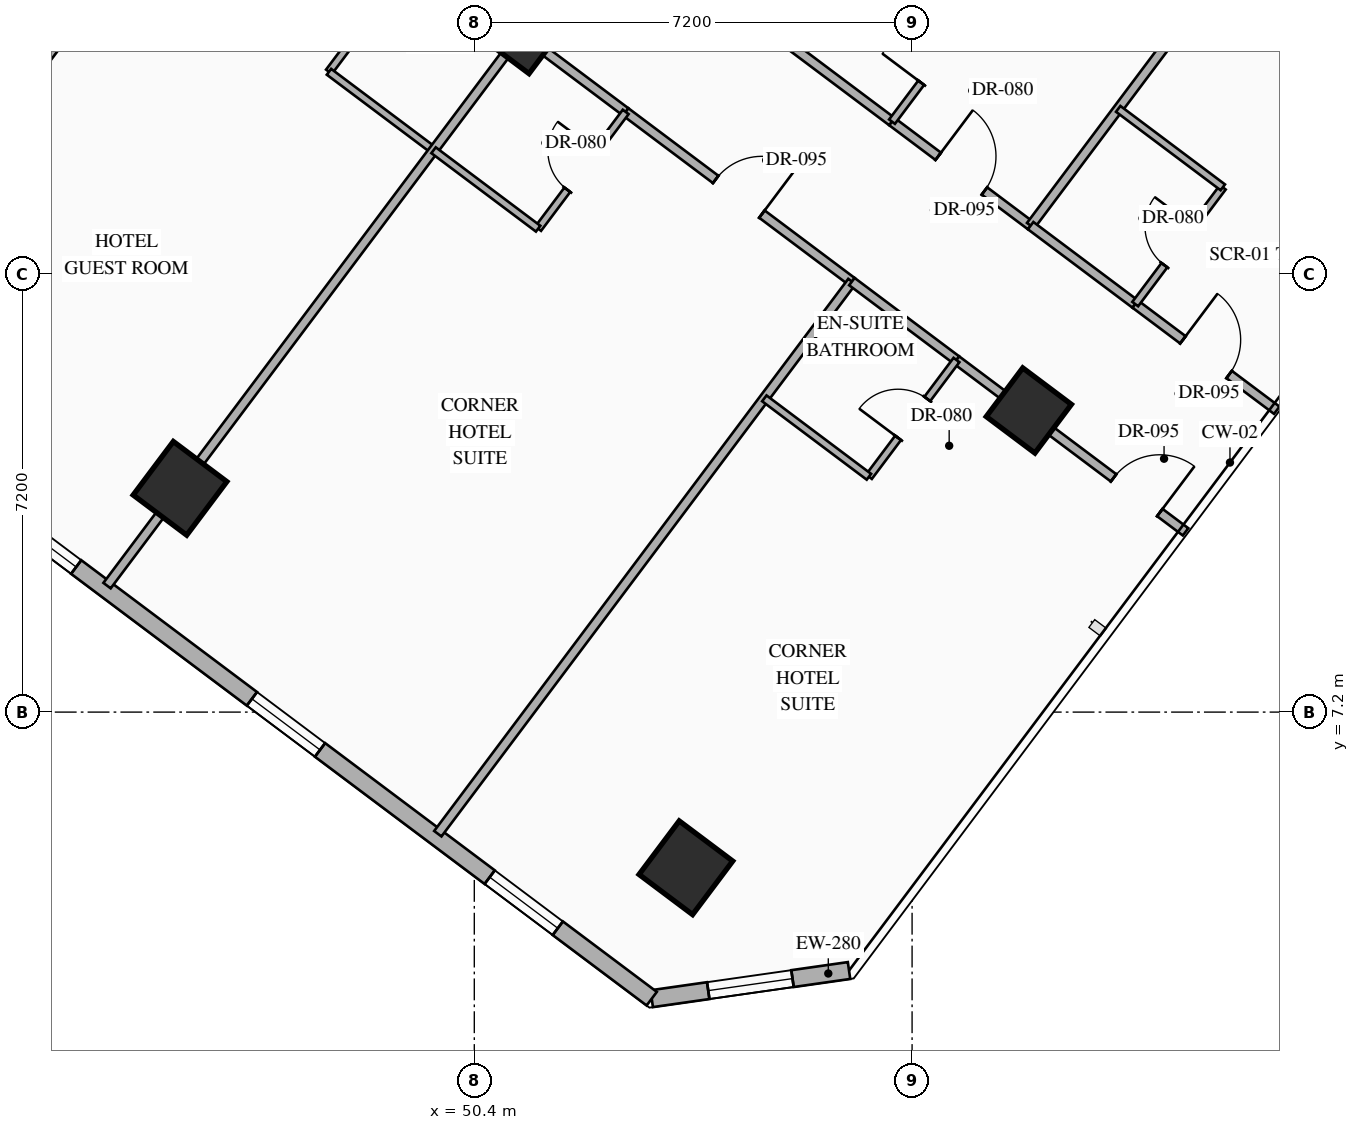
"""IFC4 building model, lengths in metres.
Left out: names, types, materials, properties, quantities, classifications, styles, units other than length and angle.
Written with IfcOpenShell. Run it as: python <this file> out.ifc"""

import sys

from ifc_helpers import new_model, si_unit, direction, frame, frame_2d, origin, origin_2d, place, context, subcontext, project, spatial, rectangle, hollow_rectangle, extrude, element, fill, save


model = new_model("IFC4")
c1 = context("Model", 3, precision=1e-05, world=origin(), true_north=direction((0.0, 1.0)))
c2 = subcontext(c1, "Body", "Model", "MODEL_VIEW")
j1 = project(units=[si_unit("LENGTHUNIT", "METRE"), si_unit("PLANEANGLEUNIT", "RADIAN")], contexts=[c1])
p1 = place(None, origin())
s1 = spatial("IfcSite", under=j1, at=p1, CompositionType="ELEMENT")
p2 = place(p1, origin())
s2 = spatial("IfcBuilding", under=s1, at=p2, CompositionType="ELEMENT")
p3 = place(p2, frame((0.0, 0.0, 50.0)))
s3 = spatial("IfcBuildingStorey", under=s2, at=p3, CompositionType="ELEMENT", Elevation=50.0)
p4 = place(p3, frame((45.56, 10.88, 0.0), z_axis=(0.0, 0.0, 1.0), x_axis=(0.799999996291, -0.600000004945, 0.0)))
e1 = element("IfcColumn", 1, at=p4, inside=s3, PredefinedType="COLUMN", context=c2, shape_type="SweptSolid", body=[
    extrude(hollow_rectangle(XDim=1.1, YDim=1.1, WallThickness=0.04, at=origin_2d()), origin(), (0.0, 0.0, 1.0), 3.35),
])
p5 = place(p3, frame((51.2, 18.4, 0.0), z_axis=(0.0, 0.0, 1.0), x_axis=(0.799999996291, -0.600000004945, 0.0)))
e2 = element("IfcColumn", 2, at=p5, inside=s3, PredefinedType="COLUMN", context=c2, shape_type="SweptSolid", body=[
    extrude(hollow_rectangle(XDim=1.0, YDim=1.0, WallThickness=0.038, at=origin_2d()), origin(), (0.0, 0.0, 1.0), 3.35),
])
p6 = place(p3, frame((53.88, 4.64, 0.0), z_axis=(0.0, 0.0, 1.0), x_axis=(0.799999996291, -0.600000004945, 0.0)))
e3 = element("IfcColumn", 3, at=p6, inside=s3, PredefinedType="COLUMN", context=c2, shape_type="SweptSolid", body=[
    extrude(hollow_rectangle(XDim=1.1, YDim=1.1, WallThickness=0.04, at=origin_2d()), origin(), (0.0, 0.0, 1.0), 3.35),
])
p7 = place(p3, frame((59.52, 12.16, 0.0), z_axis=(0.0, 0.0, 1.0), x_axis=(0.799999996291, -0.600000004945, 0.0)))
e4 = element("IfcColumn", 4, at=p7, inside=s3, PredefinedType="COLUMN", context=c2, shape_type="SweptSolid", body=[
    extrude(hollow_rectangle(XDim=1.0, YDim=1.0, WallThickness=0.038, at=origin_2d()), origin(), (0.0, 0.0, 1.0), 3.35),
])
p8 = place(p3, frame((56.563, 2.95, 0.0), z_axis=(0.0, 0.0, 1.0), x_axis=(-0.989977778067, -0.141223223777, 0.0)))
e5 = element("IfcWall", 5, at=p8, inside=s3, PredefinedType="STANDARD", context=c2, shape_type="SweptSolid", body=[
    extrude(rectangle(XDim=3.278, YDim=0.28, at=frame_2d((1.639, 0.0))), origin(), (0.0, 0.0, 1.0), 3.13),
])
p9 = place(p8, frame((0.939, 0.0, 0.85)))
e6 = element("IfcOpeningElement", 6, at=p9, cuts=e5, PredefinedType="OPENING", context=c2, shape_type="SweptSolid", body=[
    extrude(rectangle(XDim=1.4, YDim=1.8, at=frame_2d((0.7, 0.9))), frame((0.0, 0.15, 0.0), z_axis=(0.0, -1.0, 0.0), x_axis=(1.0, 0.0, 0.0)), (0.0, 0.0, 1.0), 0.3),
])
p10 = place(p3, frame((53.318, 2.487, 0.0), z_axis=(0.0, 0.0, 1.0), x_axis=(-0.800004174678, 0.599994433723, 0.0)))
e7 = element("IfcWall", 7, at=p10, inside=s3, PredefinedType="STANDARD", context=c2, shape_type="SweptSolid", body=[
    extrude(rectangle(XDim=35.089, YDim=0.28, at=frame_2d((17.544, 0.0))), origin(), (0.0, 0.0, 1.0), 3.13),
])
p11 = place(p10, frame((1.931, 0.0, 0.85)))
e8 = element("IfcOpeningElement", 8, at=p11, cuts=e7, PredefinedType="OPENING", context=c2, shape_type="SweptSolid", body=[
    extrude(rectangle(XDim=1.4, YDim=1.8, at=frame_2d((0.7, 0.9))), frame((0.0, 0.15, 0.0), z_axis=(0.0, -1.0, 0.0), x_axis=(1.0, 0.0, 0.0)), (0.0, 0.0, 1.0), 0.3),
])
p12 = place(p10, frame((6.819, 0.0, 0.85)))
e9 = element("IfcOpeningElement", 9, at=p12, cuts=e7, PredefinedType="OPENING", context=c2, shape_type="SweptSolid", body=[
    extrude(rectangle(XDim=1.4, YDim=1.8, at=frame_2d((0.7, 0.9))), frame((0.0, 0.15, 0.0), z_axis=(0.0, -1.0, 0.0), x_axis=(1.0, 0.0, 0.0)), (0.0, 0.0, 1.0), 0.3),
])
p13 = place(p10, frame((11.832, 0.0, 0.85)))
e10 = element("IfcOpeningElement", 10, at=p13, cuts=e7, PredefinedType="OPENING", context=c2, shape_type="SweptSolid", body=[
    extrude(rectangle(XDim=1.4, YDim=1.8, at=frame_2d((0.7, 0.9))), frame((0.0, 0.15, 0.0), z_axis=(0.0, -1.0, 0.0), x_axis=(1.0, 0.0, 0.0)), (0.0, 0.0, 1.0), 0.3),
])
p14 = place(p10, frame((17.647, 0.0, 0.85)))
e11 = element("IfcOpeningElement", 11, at=p14, cuts=e7, PredefinedType="OPENING", context=c2, shape_type="SweptSolid", body=[
    extrude(rectangle(XDim=1.4, YDim=1.8, at=frame_2d((0.7, 0.9))), frame((0.0, 0.15, 0.0), z_axis=(0.0, -1.0, 0.0), x_axis=(1.0, 0.0, 0.0)), (0.0, 0.0, 1.0), 0.3),
])
p15 = place(p10, frame((21.857, 0.0, 0.85)))
e12 = element("IfcOpeningElement", 12, at=p15, cuts=e7, PredefinedType="OPENING", context=c2, shape_type="SweptSolid", body=[
    extrude(rectangle(XDim=1.4, YDim=1.8, at=frame_2d((0.7, 0.9))), frame((0.0, 0.15, 0.0), z_axis=(0.0, -1.0, 0.0), x_axis=(1.0, 0.0, 0.0)), (0.0, 0.0, 1.0), 0.3),
])
p16 = place(p10, frame((26.87, 0.0, 0.85)))
e13 = element("IfcOpeningElement", 13, at=p16, cuts=e7, PredefinedType="OPENING", context=c2, shape_type="SweptSolid", body=[
    extrude(rectangle(XDim=1.4, YDim=1.8, at=frame_2d((0.7, 0.9))), frame((0.0, 0.15, 0.0), z_axis=(0.0, -1.0, 0.0), x_axis=(1.0, 0.0, 0.0)), (0.0, 0.0, 1.0), 0.3),
])
p17 = place(p10, frame((31.757, 0.0, 0.85)))
e14 = element("IfcOpeningElement", 14, at=p17, cuts=e7, PredefinedType="OPENING", context=c2, shape_type="SweptSolid", body=[
    extrude(rectangle(XDim=1.4, YDim=1.8, at=frame_2d((0.7, 0.9))), frame((0.0, 0.15, 0.0), z_axis=(0.0, -1.0, 0.0), x_axis=(1.0, 0.0, 0.0)), (0.0, 0.0, 1.0), 0.3),
])
p18 = place(p3, frame((39.464, 12.752, 0.0), z_axis=(0.0, 0.0, 1.0), x_axis=(0.6, 0.8, 0.0)))
e15 = element("IfcWall", 15, at=p18, inside=s3, PredefinedType="PARTITIONING", context=c2, shape_type="SweptSolid", body=[
    extrude(rectangle(XDim=11.51, YDim=0.15, at=frame_2d((5.755, 0.0))), origin(), (0.0, 0.0, 1.0), 3.13),
])
p19 = place(p3, frame((55.55, 18.2, 0.0), z_axis=(0.0, 0.0, 1.0), x_axis=(0.79998637334, -0.60001816845, 0.0)))
e16 = element("IfcWall", 16, at=p19, inside=s3, PredefinedType="PARTITIONING", context=c2, shape_type="SweptSolid", body=[
    extrude(rectangle(XDim=2.15, YDim=0.15, at=frame_2d((1.075, 0.0))), origin(), (0.0, 0.0, 1.0), 2.775),
])
p20 = place(p3, frame((57.27, 16.91, 0.0), z_axis=(0.0, 0.0, 1.0), x_axis=(0.800010279488, -0.599986293772, 0.0)))
e17 = element("IfcWall", 17, at=p20, inside=s3, PredefinedType="PARTITIONING", context=c2, shape_type="SweptSolid", body=[
    extrude(rectangle(XDim=2.85, YDim=0.15, at=frame_2d((1.425, 0.0))), origin(), (0.0, 0.0, 1.0), 2.775),
])
p21 = place(p20, frame((0.95, 0.0, 0.0)))
e18 = element("IfcOpeningElement", 18, at=p21, cuts=e17, PredefinedType="OPENING", context=c2, shape_type="SweptSolid", body=[
    extrude(rectangle(XDim=0.95, YDim=2.15, at=frame_2d((0.475, 1.075))), frame((0.0, 0.085, 0.0), z_axis=(0.0, -1.0, 0.0), x_axis=(1.0, 0.0, 0.0)), (0.0, 0.0, 1.0), 0.17),
])
p22 = place(p3, frame((57.27, 16.91, 0.0), z_axis=(0.0, 0.0, 1.0), x_axis=(0.599951172744, 0.800036618114, 0.0)))
e19 = element("IfcWall", 19, at=p22, inside=s3, PredefinedType="PARTITIONING", context=c2, shape_type="SweptSolid", body=[
    extrude(rectangle(XDim=2.4, YDim=0.12, at=frame_2d((1.2, 0.0))), origin(), (0.0, 0.0, 1.0), 3.13),
])
p23 = place(p22, frame((0.8, 0.0, 0.0)))
e20 = element("IfcOpeningElement", 20, at=p23, cuts=e19, PredefinedType="OPENING", context=c2, shape_type="SweptSolid", body=[
    extrude(rectangle(XDim=0.8, YDim=2.06, at=frame_2d((0.4, 1.03))), frame((0.0, 0.07, 0.0), z_axis=(0.0, -1.0, 0.0), x_axis=(1.0, 0.0, 0.0)), (0.0, 0.0, 1.0), 0.14),
])
p24 = place(p3, frame((59.55, 15.2, 0.0), z_axis=(0.0, 0.0, 1.0), x_axis=(0.599996617946, 0.80000253653, 0.0)))
e21 = element("IfcWall", 21, at=p24, inside=s3, PredefinedType="PARTITIONING", context=c2, shape_type="SweptSolid", body=[
    extrude(rectangle(XDim=11.55, YDim=0.15, at=frame_2d((5.775, 0.0))), origin(), (0.0, 0.0, 1.0), 3.13),
])
p25 = place(p3, frame((59.55, 15.2, 0.0), z_axis=(0.0, 0.0, 1.0), x_axis=(0.79998637334, -0.60001816845, 0.0)))
e22 = element("IfcWall", 22, at=p25, inside=s3, PredefinedType="PARTITIONING", context=c2, shape_type="SweptSolid", body=[
    extrude(rectangle(XDim=2.15, YDim=0.15, at=frame_2d((1.075, 0.0))), origin(), (0.0, 0.0, 1.0), 2.775),
])
p26 = place(p3, frame((61.27, 13.91, 0.0), z_axis=(0.0, 0.0, 1.0), x_axis=(0.800010068184, -0.59998657552, 0.0)))
e23 = element("IfcWall", 23, at=p26, inside=s3, PredefinedType="PARTITIONING", context=c2, shape_type="SweptSolid", body=[
    extrude(rectangle(XDim=2.91, YDim=0.15, at=frame_2d((1.455, 0.0))), origin(), (0.0, 0.0, 1.0), 3.13),
])
p27 = place(p26, frame((0.98, 0.0, 0.0)))
e24 = element("IfcOpeningElement", 24, at=p27, cuts=e23, PredefinedType="OPENING", context=c2, shape_type="SweptSolid", body=[
    extrude(rectangle(XDim=0.95, YDim=2.15, at=frame_2d((0.475, 1.075))), frame((0.0, 0.085, 0.0), z_axis=(0.0, -1.0, 0.0), x_axis=(1.0, 0.0, 0.0)), (0.0, 0.0, 1.0), 0.17),
])
p28 = place(p3, frame((61.27, 13.91, 0.0), z_axis=(0.0, 0.0, 1.0), x_axis=(0.599951172744, 0.800036618114, 0.0)))
e25 = element("IfcWall", 25, at=p28, inside=s3, PredefinedType="PARTITIONING", context=c2, shape_type="SweptSolid", body=[
    extrude(rectangle(XDim=2.4, YDim=0.12, at=frame_2d((1.2, 0.0))), origin(), (0.0, 0.0, 1.0), 3.13),
])
p29 = place(p28, frame((0.8, 0.0, 0.0)))
e26 = element("IfcOpeningElement", 26, at=p29, cuts=e25, PredefinedType="OPENING", context=c2, shape_type="SweptSolid", body=[
    extrude(rectangle(XDim=0.8, YDim=2.06, at=frame_2d((0.4, 1.03))), frame((0.0, 0.07, 0.0), z_axis=(0.0, -1.0, 0.0), x_axis=(1.0, 0.0, 0.0)), (0.0, 0.0, 1.0), 0.14),
])
p30 = place(p3, frame((60.99, 17.12, 0.0), z_axis=(0.0, 0.0, 1.0), x_axis=(0.79998637334, -0.60001816845, 0.0)))
e27 = element("IfcWall", 27, at=p30, inside=s3, PredefinedType="PARTITIONING", context=c2, shape_type="SweptSolid", body=[
    extrude(rectangle(XDim=2.15, YDim=0.12, at=frame_2d((1.075, 0.0))), origin(), (0.0, 0.0, 1.0), 3.13),
])
p31 = place(p3, frame((48.01, 17.73, 0.0), z_axis=(0.0, 0.0, 1.0), x_axis=(0.6, 0.8, 0.0)))
e28 = element("IfcWall", 28, at=p31, inside=s3, PredefinedType="PARTITIONING", context=c2, shape_type="SweptSolid", body=[
    extrude(rectangle(XDim=2.4, YDim=0.12, at=frame_2d((1.2, 0.0))), origin(), (0.0, 0.0, 1.0), 3.13),
])
p32 = place(p31, frame((0.8, 0.0, 0.0)))
e29 = element("IfcOpeningElement", 29, at=p32, cuts=e28, PredefinedType="OPENING", context=c2, shape_type="SweptSolid", body=[
    extrude(rectangle(XDim=0.8, YDim=2.06, at=frame_2d((0.4, 1.03))), frame((0.0, 0.07, 0.0), z_axis=(0.0, -1.0, 0.0), x_axis=(1.0, 0.0, 0.0)), (0.0, 0.0, 1.0), 0.14),
])
p33 = place(p3, frame((48.01, 17.73, 0.0), z_axis=(0.0, 0.0, 1.0), x_axis=(0.79998637334, -0.60001816845, 0.0)))
e30 = element("IfcWall", 30, at=p33, inside=s3, PredefinedType="PARTITIONING", context=c2, shape_type="SweptSolid", body=[
    extrude(rectangle(XDim=2.15, YDim=0.12, at=frame_2d((1.075, 0.0))), origin(), (0.0, 0.0, 1.0), 3.13),
])
p34 = place(p3, frame((44.36, 9.28, 0.0), z_axis=(0.0, 0.0, 1.0), x_axis=(0.599986233332, 0.800010324816, 0.0)))
e31 = element("IfcWall", 31, at=p34, inside=s3, PredefinedType="PARTITIONING", context=c2, shape_type="SweptSolid", body=[
    extrude(rectangle(XDim=11.35, YDim=0.15, at=frame_2d((5.675, 0.0))), origin(), (0.0, 0.0, 1.0), 2.425),
])
p35 = place(p3, frame((51.17, 18.36, 0.0), z_axis=(0.0, 0.0, 1.0), x_axis=(0.79998637334, -0.60001816845, 0.0)))
e32 = element("IfcWall", 32, at=p35, inside=s3, PredefinedType="PARTITIONING", context=c2, shape_type="SweptSolid", body=[
    extrude(rectangle(XDim=2.15, YDim=0.15, at=frame_2d((1.075, 0.0))), origin(), (0.0, 0.0, 1.0), 2.425),
])
p36 = place(p3, frame((52.89, 17.07, 0.0), z_axis=(0.0, 0.0, 1.0), x_axis=(0.800012600101, -0.599983199498, 0.0)))
e33 = element("IfcWall", 33, at=p36, inside=s3, PredefinedType="PARTITIONING", context=c2, shape_type="SweptSolid", body=[
    extrude(rectangle(XDim=4.65, YDim=0.15, at=frame_2d((2.325, 0.0))), origin(), (0.0, 0.0, 1.0), 2.425),
])
p37 = place(p36, frame((1.85, 0.0, 0.0)))
e34 = element("IfcOpeningElement", 34, at=p37, cuts=e33, PredefinedType="OPENING", context=c2, shape_type="SweptSolid", body=[
    extrude(rectangle(XDim=0.95, YDim=2.15, at=frame_2d((0.475, 1.075))), frame((0.0, 0.085, 0.0), z_axis=(0.0, -1.0, 0.0), x_axis=(1.0, 0.0, 0.0)), (0.0, 0.0, 1.0), 0.17),
])
p38 = place(p3, frame((51.45, 15.15, 0.0), z_axis=(0.0, 0.0, 1.0), x_axis=(0.599951172744, 0.800036618114, 0.0)))
e35 = element("IfcWall", 35, at=p38, inside=s3, PredefinedType="PARTITIONING", context=c2, shape_type="SweptSolid", body=[
    extrude(rectangle(XDim=2.4, YDim=0.12, at=frame_2d((1.2, 0.0))), origin(), (0.0, 0.0, 1.0), 3.13),
])
p39 = place(p38, frame((0.8, 0.0, 0.0)))
e36 = element("IfcOpeningElement", 36, at=p39, cuts=e35, PredefinedType="OPENING", context=c2, shape_type="SweptSolid", body=[
    extrude(rectangle(XDim=0.8, YDim=2.06, at=frame_2d((0.4, 1.03))), frame((0.0, 0.07, 0.0), z_axis=(0.0, -1.0, 0.0), x_axis=(1.0, 0.0, 0.0)), (0.0, 0.0, 1.0), 0.14),
])
p40 = place(p3, frame((49.73, 16.44, 0.0), z_axis=(0.0, 0.0, 1.0), x_axis=(0.79998637334, -0.60001816845, 0.0)))
e37 = element("IfcWall", 37, at=p40, inside=s3, PredefinedType="PARTITIONING", context=c2, shape_type="SweptSolid", body=[
    extrude(rectangle(XDim=2.15, YDim=0.12, at=frame_2d((1.075, 0.0))), origin(), (0.0, 0.0, 1.0), 3.13),
])
p41 = place(p3, frame((49.8, 5.2, 0.0), z_axis=(0.0, 0.0, 1.0), x_axis=(0.6, 0.8, 0.0)))
e38 = element("IfcWall", 38, at=p41, inside=s3, PredefinedType="PARTITIONING", context=c2, shape_type="SweptSolid", body=[
    extrude(rectangle(XDim=11.35, YDim=0.15, at=frame_2d((5.675, 0.0))), origin(), (0.0, 0.0, 1.0), 3.13),
])
p42 = place(p3, frame((56.61, 14.28, 0.0), z_axis=(0.0, 0.0, 1.0), x_axis=(0.79998637334, -0.60001816845, 0.0)))
e39 = element("IfcWall", 39, at=p42, inside=s3, PredefinedType="PARTITIONING", context=c2, shape_type="SweptSolid", body=[
    extrude(rectangle(XDim=2.15, YDim=0.15, at=frame_2d((1.075, 0.0))), origin(), (0.0, 0.0, 1.0), 2.425),
])
p43 = place(p3, frame((58.33, 12.99, 0.0), z_axis=(0.0, 0.0, 1.0), x_axis=(0.799993779569, -0.600008293819, 0.0)))
e40 = element("IfcWall", 40, at=p43, inside=s3, PredefinedType="PARTITIONING", context=c2, shape_type="SweptSolid", body=[
    extrude(rectangle(XDim=4.71, YDim=0.15, at=frame_2d((2.355, 0.0))), origin(), (0.0, 0.0, 1.0), 2.425),
])
p44 = place(p43, frame((3.23, 0.0, 0.0)))
e41 = element("IfcOpeningElement", 41, at=p44, cuts=e40, PredefinedType="OPENING", context=c2, shape_type="SweptSolid", body=[
    extrude(rectangle(XDim=0.95, YDim=2.15, at=frame_2d((0.475, 1.075))), frame((0.0, 0.085, 0.0), z_axis=(0.0, -1.0, 0.0), x_axis=(1.0, 0.0, 0.0)), (0.0, 0.0, 1.0), 0.17),
])
p45 = place(p3, frame((56.89, 11.07, 0.0), z_axis=(0.0, 0.0, 1.0), x_axis=(0.600065100855, 0.79995117022, 0.0)))
e42 = element("IfcWall", 42, at=p45, inside=s3, PredefinedType="PARTITIONING", context=c2, shape_type="SweptSolid", body=[
    extrude(rectangle(XDim=2.4, YDim=0.12, at=frame_2d((1.2, 0.0))), origin(), (0.0, 0.0, 1.0), 3.13),
])
p46 = place(p45, frame((0.8, 0.0, 0.0)))
e43 = element("IfcOpeningElement", 43, at=p46, cuts=e42, PredefinedType="OPENING", context=c2, shape_type="SweptSolid", body=[
    extrude(rectangle(XDim=0.8, YDim=2.06, at=frame_2d((0.4, 1.03))), frame((0.0, 0.07, 0.0), z_axis=(0.0, -1.0, 0.0), x_axis=(1.0, 0.0, 0.0)), (0.0, 0.0, 1.0), 0.14),
])
p47 = place(p3, frame((55.17, 12.36, 0.0), z_axis=(0.0, 0.0, 1.0), x_axis=(0.79998637334, -0.60001816845, 0.0)))
e44 = element("IfcWall", 44, at=p47, inside=s3, PredefinedType="PARTITIONING", context=c2, shape_type="SweptSolid", body=[
    extrude(rectangle(XDim=2.15, YDim=0.12, at=frame_2d((1.075, 0.0))), origin(), (0.0, 0.0, 1.0), 3.13),
])
p48 = place(p9, origin())
e45 = element("IfcWindow", 45, at=p48, inside=s3, PartitioningType="SINGLE_PANEL", PredefinedType="WINDOW", context=c2, shape_type="SweptSolid", body=[
    extrude(rectangle(XDim=1.4, YDim=1.8, at=frame_2d((0.7, 0.9))), frame((0.0, 0.03, 0.0), z_axis=(0.0, -1.0, 0.0), x_axis=(1.0, 0.0, 0.0)), (0.0, 0.0, 1.0), 0.06),
])
fill(e6, e45)
p49 = place(p11, origin())
e46 = element("IfcWindow", 46, at=p49, inside=s3, PartitioningType="SINGLE_PANEL", PredefinedType="WINDOW", context=c2, shape_type="SweptSolid", body=[
    extrude(rectangle(XDim=1.4, YDim=1.8, at=frame_2d((0.7, 0.9))), frame((0.0, 0.03, 0.0), z_axis=(0.0, -1.0, 0.0), x_axis=(1.0, 0.0, 0.0)), (0.0, 0.0, 1.0), 0.06),
])
fill(e8, e46)
p50 = place(p12, origin())
e47 = element("IfcWindow", 47, at=p50, inside=s3, PartitioningType="SINGLE_PANEL", PredefinedType="WINDOW", context=c2, shape_type="SweptSolid", body=[
    extrude(rectangle(XDim=1.4, YDim=1.8, at=frame_2d((0.7, 0.9))), frame((0.0, 0.03, 0.0), z_axis=(0.0, -1.0, 0.0), x_axis=(1.0, 0.0, 0.0)), (0.0, 0.0, 1.0), 0.06),
])
fill(e9, e47)
p51 = place(p13, origin())
e48 = element("IfcWindow", 48, at=p51, inside=s3, PartitioningType="SINGLE_PANEL", PredefinedType="WINDOW", context=c2, shape_type="SweptSolid", body=[
    extrude(rectangle(XDim=1.4, YDim=1.8, at=frame_2d((0.7, 0.9))), frame((0.0, 0.03, 0.0), z_axis=(0.0, -1.0, 0.0), x_axis=(1.0, 0.0, 0.0)), (0.0, 0.0, 1.0), 0.06),
])
fill(e10, e48)
p52 = place(p21, origin())
e49 = element("IfcDoor", 49, at=p52, inside=s3, OperationType="SINGLE_SWING_LEFT", PredefinedType="DOOR", context=c2, shape_type="SweptSolid", body=[
    extrude(rectangle(XDim=0.95, YDim=2.15, at=frame_2d((0.475, 1.075))), frame((0.0, 0.025, 0.0), z_axis=(0.0, -1.0, 0.0), x_axis=(1.0, 0.0, 0.0)), (0.0, 0.0, 1.0), 0.05),
])
fill(e18, e49)
p53 = place(p23, origin())
e50 = element("IfcDoor", 50, at=p53, inside=s3, OperationType="SINGLE_SWING_LEFT", PredefinedType="DOOR", context=c2, shape_type="SweptSolid", body=[
    extrude(rectangle(XDim=0.8, YDim=2.06, at=frame_2d((0.4, 1.03))), frame((0.0, 0.025, 0.0), z_axis=(0.0, -1.0, 0.0), x_axis=(1.0, 0.0, 0.0)), (0.0, 0.0, 1.0), 0.05),
])
fill(e20, e50)
p54 = place(p27, origin())
e51 = element("IfcDoor", 51, at=p54, inside=s3, OperationType="SINGLE_SWING_LEFT", PredefinedType="DOOR", context=c2, shape_type="SweptSolid", body=[
    extrude(rectangle(XDim=0.95, YDim=2.15, at=frame_2d((0.475, 1.075))), frame((0.0, 0.025, 0.0), z_axis=(0.0, -1.0, 0.0), x_axis=(1.0, 0.0, 0.0)), (0.0, 0.0, 1.0), 0.05),
])
fill(e24, e51)
p55 = place(p29, origin())
e52 = element("IfcDoor", 52, at=p55, inside=s3, OperationType="SINGLE_SWING_RIGHT", PredefinedType="DOOR", context=c2, shape_type="SweptSolid", body=[
    extrude(rectangle(XDim=0.8, YDim=2.06, at=frame_2d((0.4, 1.03))), frame((0.0, 0.025, 0.0), z_axis=(0.0, -1.0, 0.0), x_axis=(1.0, 0.0, 0.0)), (0.0, 0.0, 1.0), 0.05),
])
fill(e26, e52)
p56 = place(p37, origin())
e53 = element("IfcDoor", 53, at=p56, inside=s3, OperationType="SINGLE_SWING_RIGHT", PredefinedType="DOOR", context=c2, shape_type="SweptSolid", body=[
    extrude(rectangle(XDim=0.95, YDim=2.15, at=frame_2d((0.475, 1.075))), frame((0.0, 0.025, 0.0), z_axis=(0.0, -1.0, 0.0), x_axis=(1.0, 0.0, 0.0)), (0.0, 0.0, 1.0), 0.05),
])
fill(e34, e53)
p57 = place(p39, origin())
e54 = element("IfcDoor", 54, at=p57, inside=s3, OperationType="SINGLE_SWING_RIGHT", PredefinedType="DOOR", context=c2, shape_type="SweptSolid", body=[
    extrude(rectangle(XDim=0.8, YDim=2.06, at=frame_2d((0.4, 1.03))), frame((0.0, 0.025, 0.0), z_axis=(0.0, -1.0, 0.0), x_axis=(1.0, 0.0, 0.0)), (0.0, 0.0, 1.0), 0.05),
])
fill(e36, e54)
p58 = place(p44, origin())
e55 = element("IfcDoor", 55, at=p58, inside=s3, OperationType="SINGLE_SWING_RIGHT", PredefinedType="DOOR", context=c2, shape_type="SweptSolid", body=[
    extrude(rectangle(XDim=0.95, YDim=2.15, at=frame_2d((0.475, 1.075))), frame((0.0, 0.025, 0.0), z_axis=(0.0, -1.0, 0.0), x_axis=(1.0, 0.0, 0.0)), (0.0, 0.0, 1.0), 0.05),
])
fill(e41, e55)
p59 = place(p46, origin())
e56 = element("IfcDoor", 56, at=p59, inside=s3, OperationType="SINGLE_SWING_LEFT", PredefinedType="DOOR", context=c2, shape_type="SweptSolid", body=[
    extrude(rectangle(XDim=0.8, YDim=2.06, at=frame_2d((0.4, 1.03))), frame((0.0, 0.025, 0.0), z_axis=(0.0, -1.0, 0.0), x_axis=(1.0, 0.0, 0.0)), (0.0, 0.0, 1.0), 0.05),
])
fill(e43, e56)
save(model, sys.argv[1])
